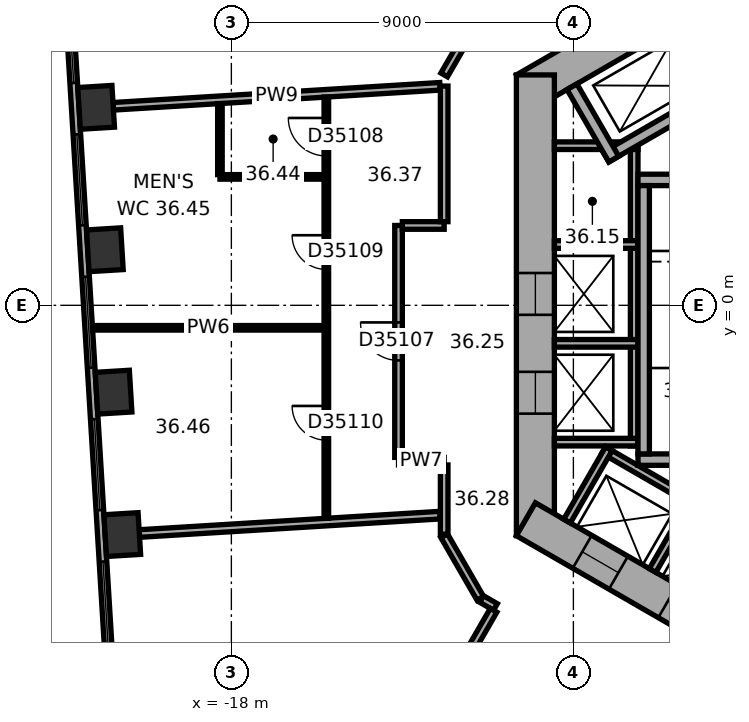
"""IFC4 building model, lengths in metres.
Left out: names, types, materials, properties, quantities, classifications, styles, units other than length and angle.
Written with IfcOpenShell. Run it as: python <this file> out.ifc"""

import sys

from ifc_helpers import new_model, si_unit, direction, frame, frame_2d, origin, origin_2d, place, context, subcontext, project, spatial, rectangle, extrude, element, fill, save


model = new_model("IFC4")
c1 = context("Model", 3, precision=1e-05, world=origin(), true_north=direction((0.0, 1.0)))
c2 = subcontext(c1, "Body", "Model", "MODEL_VIEW")
j1 = project(units=[si_unit("LENGTHUNIT", "METRE"), si_unit("PLANEANGLEUNIT", "RADIAN")], contexts=[c1])
p1 = place(None, origin())
s1 = spatial("IfcSite", under=j1, at=p1, CompositionType="ELEMENT")
p2 = place(p1, origin())
s2 = spatial("IfcBuilding", under=s1, at=p2, CompositionType="ELEMENT")
p3 = place(p2, frame((0.0, 0.0, 150.3)))
s3 = spatial("IfcBuildingStorey", under=s2, at=p3, CompositionType="ELEMENT", Elevation=150.3)
for number, where, z_axis, x_axis in (
    (1, (-21.558, 5.209, 0.0), (0.0, 0.0, 1.0), (0.061, -0.998, 0.0)),
    (2, (-21.329, 1.462, 0.0), (0.0, 0.0, 1.0), (0.061, -0.998, 0.0)),
    (3, (-21.1, -2.285, 0.0), (0.0, 0.0, 1.0), (0.061, -0.998, 0.0)),
    (4, (-20.871, -6.032, 0.0), (0.0, 0.0, 1.0), (0.061, -0.998, 0.0)),
):
    element("IfcColumn", number, at=place(p3, frame(where, z_axis=z_axis, x_axis=x_axis)), inside=s3, PredefinedType="COLUMN", context=c2, shape_type="SweptSolid", body=[
        extrude(rectangle(XDim=1.1, YDim=0.9, at=origin_2d()), origin(), (0.0, 0.0, 1.0), 3.7),
    ])
p4 = place(p3, frame((0.25, 11.691, 0.0), z_axis=(0.0, 0.0, 1.0), x_axis=(-0.866022616891, -0.50000482701, 0.0)))
e5 = element("IfcWall", 5, at=p4, inside=s3, PredefinedType="SHEAR", context=c2, shape_type="SweptSolid", body=[
    extrude(rectangle(XDim=12.125, YDim=1.0, at=frame_2d((6.062, 0.0))), origin(), (0.0, 0.0, 1.0), 3.7),
])
p5 = place(p4, frame((6.262, 0.0, 0.0)))
e6 = element("IfcOpeningElement", 6, at=p5, cuts=e5, PredefinedType="OPENING", context=c2, shape_type="SweptSolid", body=[
    extrude(rectangle(XDim=1.5, YDim=2.1, at=frame_2d((0.75, 1.05))), frame((0.0, 0.51, 0.0), z_axis=(0.0, -1.0, 0.0), x_axis=(1.0, 0.0, 0.0)), (0.0, 0.0, 1.0), 1.02),
])
p6 = place(p4, frame((1.812, 0.0, 0.0)))
e7 = element("IfcOpeningElement", 7, at=p6, cuts=e5, PredefinedType="OPENING", context=c2, shape_type="SweptSolid", body=[
    extrude(rectangle(XDim=0.9, YDim=2.1, at=frame_2d((0.45, 1.05))), frame((0.0, 0.51, 0.0), z_axis=(0.0, -1.0, 0.0), x_axis=(1.0, 0.0, 0.0)), (0.0, 0.0, 1.0), 1.02),
])
p7 = place(p4, frame((4.412, 0.0, 0.0)))
e8 = element("IfcOpeningElement", 8, at=p7, cuts=e5, PredefinedType="OPENING", context=c2, shape_type="SweptSolid", body=[
    extrude(rectangle(XDim=0.9, YDim=2.1, at=frame_2d((0.45, 1.05))), frame((0.0, 0.51, 0.0), z_axis=(0.0, -1.0, 0.0), x_axis=(1.0, 0.0, 0.0)), (0.0, 0.0, 1.0), 1.02),
])
p8 = place(p3, frame((-10.0, 6.062, 0.0), z_axis=(0.0, 0.0, 1.0), x_axis=(0.0, -1.0, 0.0)))
e9 = element("IfcWall", 9, at=p8, inside=s3, PredefinedType="SHEAR", context=c2, shape_type="SweptSolid", body=[
    extrude(rectangle(XDim=12.125, YDim=1.0, at=frame_2d((6.062, 0.0))), origin(), (0.0, 0.0, 1.0), 3.7),
])
p9 = place(p8, frame((5.212, 0.0, 0.0)))
e10 = element("IfcOpeningElement", 10, at=p9, cuts=e9, PredefinedType="OPENING", context=c2, shape_type="SweptSolid", body=[
    extrude(rectangle(XDim=1.1, YDim=2.1, at=frame_2d((0.55, 1.05))), frame((0.0, 0.51, 0.0), z_axis=(0.0, -1.0, 0.0), x_axis=(1.0, 0.0, 0.0)), (0.0, 0.0, 1.0), 1.02),
])
p10 = place(p8, frame((7.812, 0.0, 0.0)))
e11 = element("IfcOpeningElement", 11, at=p10, cuts=e9, PredefinedType="OPENING", context=c2, shape_type="SweptSolid", body=[
    extrude(rectangle(XDim=1.1, YDim=2.1, at=frame_2d((0.55, 1.05))), frame((0.0, 0.51, 0.0), z_axis=(0.0, -1.0, 0.0), x_axis=(1.0, 0.0, 0.0)), (0.0, 0.0, 1.0), 1.02),
])
p11 = place(p3, frame((-10.25, -5.629, 0.0), z_axis=(0.0, 0.0, 1.0), x_axis=(0.866022616891, -0.50000482701, 0.0)))
e12 = element("IfcWall", 12, at=p11, inside=s3, PredefinedType="SHEAR", context=c2, shape_type="SweptSolid", body=[
    extrude(rectangle(XDim=12.125, YDim=1.0, at=frame_2d((6.062, 0.0))), origin(), (0.0, 0.0, 1.0), 3.7),
])
p12 = place(p11, frame((6.262, 0.0, 0.0)))
e13 = element("IfcOpeningElement", 13, at=p12, cuts=e12, PredefinedType="OPENING", context=c2, shape_type="SweptSolid", body=[
    extrude(rectangle(XDim=1.5, YDim=2.1, at=frame_2d((0.75, 1.05))), frame((0.0, 0.51, 0.0), z_axis=(0.0, -1.0, 0.0), x_axis=(1.0, 0.0, 0.0)), (0.0, 0.0, 1.0), 1.02),
])
p13 = place(p11, frame((1.712, 0.0, 0.0)))
e14 = element("IfcOpeningElement", 14, at=p13, cuts=e12, PredefinedType="OPENING", context=c2, shape_type="SweptSolid", body=[
    extrude(rectangle(XDim=1.1, YDim=2.1, at=frame_2d((0.55, 1.05))), frame((0.0, 0.51, 0.0), z_axis=(0.0, -1.0, 0.0), x_axis=(1.0, 0.0, 0.0)), (0.0, 0.0, 1.0), 1.02),
])
p14 = place(p11, frame((4.312, 0.0, 0.0)))
e15 = element("IfcOpeningElement", 15, at=p14, cuts=e12, PredefinedType="OPENING", context=c2, shape_type="SweptSolid", body=[
    extrude(rectangle(XDim=1.1, YDim=2.1, at=frame_2d((0.55, 1.05))), frame((0.0, 0.51, 0.0), z_axis=(0.0, -1.0, 0.0), x_axis=(1.0, 0.0, 0.0)), (0.0, 0.0, 1.0), 1.02),
])
p15 = place(p3, frame((-22.375, 9.557, 0.0), z_axis=(0.0, 0.0, 1.0), x_axis=(0.061036015339, -0.998135564356, 0.0)))
e16 = element("IfcWall", 16, at=p15, inside=s3, PredefinedType="STANDARD", context=c2, shape_type="SweptSolid", body=[
    extrude(rectangle(XDim=20.044, YDim=0.2, at=frame_2d((10.022, 0.0))), origin(), (0.0, 0.0, 1.0), 3.7),
])
p16 = place(p15, frame((1.313, 0.0, 0.9)))
e17 = element("IfcOpeningElement", 17, at=p16, cuts=e16, PredefinedType="OPENING", context=c2, shape_type="SweptSolid", body=[
    extrude(rectangle(XDim=2.4, YDim=2.0, at=frame_2d((1.2, 1.0))), frame((0.0, 0.11, 0.0), z_axis=(0.0, -1.0, 0.0), x_axis=(1.0, 0.0, 0.0)), (0.0, 0.0, 1.0), 0.22),
])
p17 = place(p15, frame((5.067, 0.0, 0.9)))
e18 = element("IfcOpeningElement", 18, at=p17, cuts=e16, PredefinedType="OPENING", context=c2, shape_type="SweptSolid", body=[
    extrude(rectangle(XDim=2.4, YDim=2.0, at=frame_2d((1.2, 1.0))), frame((0.0, 0.11, 0.0), z_axis=(0.0, -1.0, 0.0), x_axis=(1.0, 0.0, 0.0)), (0.0, 0.0, 1.0), 0.22),
])
p18 = place(p15, frame((8.821, 0.0, 0.9)))
e19 = element("IfcOpeningElement", 19, at=p18, cuts=e16, PredefinedType="OPENING", context=c2, shape_type="SweptSolid", body=[
    extrude(rectangle(XDim=2.4, YDim=2.0, at=frame_2d((1.2, 1.0))), frame((0.0, 0.11, 0.0), z_axis=(0.0, -1.0, 0.0), x_axis=(1.0, 0.0, 0.0)), (0.0, 0.0, 1.0), 0.22),
])
p19 = place(p15, frame((12.575, 0.0, 0.9)))
e20 = element("IfcOpeningElement", 20, at=p19, cuts=e16, PredefinedType="OPENING", context=c2, shape_type="SweptSolid", body=[
    extrude(rectangle(XDim=2.4, YDim=2.0, at=frame_2d((1.2, 1.0))), frame((0.0, 0.11, 0.0), z_axis=(0.0, -1.0, 0.0), x_axis=(1.0, 0.0, 0.0)), (0.0, 0.0, 1.0), 0.22),
])
p20 = place(p15, frame((16.329, 0.0, 0.9)))
e21 = element("IfcOpeningElement", 21, at=p20, cuts=e16, PredefinedType="OPENING", context=c2, shape_type="SweptSolid", body=[
    extrude(rectangle(XDim=2.4, YDim=2.0, at=frame_2d((1.2, 1.0))), frame((0.0, 0.11, 0.0), z_axis=(0.0, -1.0, 0.0), x_axis=(1.0, 0.0, 0.0)), (0.0, 0.0, 1.0), 0.22),
])
p21 = place(p3, frame((-7.4, 4.3, 0.0), z_axis=(0.0, 0.0, 1.0), x_axis=(0.0, -1.0, 0.0)))
e22 = element("IfcWall", 22, at=p21, inside=s3, PredefinedType="PARTITIONING", context=c2, shape_type="SweptSolid", body=[
    extrude(rectangle(XDim=8.0, YDim=0.2, at=frame_2d((4.0, 0.0))), origin(), (0.0, 0.0, 1.0), 3.42),
])
for number, where, z_axis, x_axis in (
    (23, (-7.3, 4.2, 0.0), (0.0, 0.0, 1.0), (-1.0, 0.0, 0.0)),
    (24, (-7.3, 1.6, 0.0), (0.0, 0.0, 1.0), (-1.0, 0.0, 0.0)),
    (25, (-7.3, -1.0, 0.0), (0.0, 0.0, 1.0), (-1.0, 0.0, 0.0)),
    (26, (-7.3, -3.6, 0.0), (0.0, 0.0, 1.0), (-1.0, 0.0, 0.0)),
):
    element("IfcWall", number, at=place(p3, frame(where, z_axis=z_axis, x_axis=x_axis)), inside=s3, PredefinedType="PARTITIONING", context=c2, shape_type="SweptSolid", body=[
        extrude(rectangle(XDim=2.2, YDim=0.2, at=frame_2d((1.1, 0.0))), origin(), (0.0, 0.0, 1.0), 3.42),
    ])
p22 = place(p3, frame((-8.203, -3.809, 0.0), z_axis=(0.0, 0.0, 1.0), x_axis=(0.866028230842, -0.499995103361, 0.0)))
e27 = element("IfcWall", 27, at=p22, inside=s3, PredefinedType="PARTITIONING", context=c2, shape_type="SweptSolid", body=[
    extrude(rectangle(XDim=5.4, YDim=0.2, at=frame_2d((2.7, 0.0))), origin(), (0.0, 0.0, 1.0), 3.42),
])
for number, where, z_axis, x_axis in (
    (28, (-8.067, -3.772, 0.0), (0.0, 0.0, 1.0), (-0.5, -0.866, 0.0)),
    (29, (-5.815, -5.072, 0.0), (0.0, 0.0, 1.0), (-0.5, -0.866, 0.0)),
):
    element("IfcWall", number, at=place(p3, frame(where, z_axis=z_axis, x_axis=x_axis)), inside=s3, PredefinedType="PARTITIONING", context=c2, shape_type="SweptSolid", body=[
        extrude(rectangle(XDim=2.2, YDim=0.2, at=frame_2d((1.1, 0.0))), origin(), (0.0, 0.0, 1.0), 3.42),
    ])
p23 = place(p3, frame((-2.6, 3.3, 0.0), z_axis=(0.0, 0.0, 1.0), x_axis=(-1.0, 0.0, 0.0)))
e30 = element("IfcWall", 30, at=p23, inside=s3, PredefinedType="SHEAR", context=c2, shape_type="SweptSolid", body=[
    extrude(rectangle(XDim=4.7, YDim=0.3, at=frame_2d((2.35, 0.0))), origin(), (0.0, 0.0, 1.0), 3.42),
])
p24 = place(p23, frame((0.8, 0.0, 0.0)))
e31 = element("IfcOpeningElement", 31, at=p24, cuts=e30, PredefinedType="OPENING", context=c2, shape_type="SweptSolid", body=[
    extrude(rectangle(XDim=1.2, YDim=2.1, at=frame_2d((0.6, 1.05))), frame((0.0, 0.16, 0.0), z_axis=(0.0, -1.0, 0.0), x_axis=(1.0, 0.0, 0.0)), (0.0, 0.0, 1.0), 0.32),
])
p25 = place(p3, frame((-2.6, -4.06, 0.0), z_axis=(0.0, 0.0, 1.0), x_axis=(-1.0, 0.0, 0.0)))
e32 = element("IfcWall", 32, at=p25, inside=s3, PredefinedType="SHEAR", context=c2, shape_type="SweptSolid", body=[
    extrude(rectangle(XDim=4.7, YDim=0.3, at=frame_2d((2.35, 0.0))), origin(), (0.0, 0.0, 1.0), 3.42),
])
p26 = place(p3, frame((-7.15, 3.15, 0.0), z_axis=(0.0, 0.0, 1.0), x_axis=(0.0, -1.0, 0.0)))
e33 = element("IfcWall", 33, at=p26, inside=s3, PredefinedType="SHEAR", context=c2, shape_type="SweptSolid", body=[
    extrude(rectangle(XDim=7.06, YDim=0.3, at=frame_2d((3.53, 0.0))), origin(), (0.0, 0.0, 1.0), 3.42),
])
p27 = place(p3, frame((-5.295, 5.372, 0.0), z_axis=(0.0, 0.0, 1.0), x_axis=(-0.500077893725, 0.86598042715, 0.0)))
e34 = element("IfcWall", 34, at=p27, inside=s3, PredefinedType="SHEAR", context=c2, shape_type="SweptSolid", body=[
    extrude(rectangle(XDim=2.2, YDim=0.3, at=frame_2d((1.1, 0.0))), origin(), (0.0, 0.0, 1.0), 3.42),
])
p28 = place(p27, frame((0.7, 0.0, 0.0)))
e35 = element("IfcOpeningElement", 35, at=p28, cuts=e34, PredefinedType="OPENING", context=c2, shape_type="SweptSolid", body=[
    extrude(rectangle(XDim=1.1, YDim=2.1, at=frame_2d((0.55, 1.05))), frame((0.0, 0.16, 0.0), z_axis=(0.0, -1.0, 0.0), x_axis=(1.0, 0.0, 0.0)), (0.0, 0.0, 1.0), 0.32),
])
p29 = place(p3, frame((-5.24, 5.577, 0.0), z_axis=(0.0, 0.0, 1.0), x_axis=(-0.866014461049, -0.500018952895, 0.0)))
e36 = element("IfcWall", 36, at=p29, inside=s3, PredefinedType="SHEAR", context=c2, shape_type="SweptSolid", body=[
    extrude(rectangle(XDim=3.35, YDim=0.3, at=frame_2d((1.675, 0.0))), origin(), (0.0, 0.0, 1.0), 3.42),
])
p30 = place(p3, frame((-7.937, 3.847, 0.0), z_axis=(0.0, 0.0, 1.0), x_axis=(-0.50002983664, 0.866008176907, 0.0)))
e37 = element("IfcWall", 37, at=p30, inside=s3, PredefinedType="SHEAR", context=c2, shape_type="SweptSolid", body=[
    extrude(rectangle(XDim=2.2, YDim=0.3, at=frame_2d((1.1, 0.0))), origin(), (0.0, 0.0, 1.0), 3.42),
])
p31 = place(p3, frame((-21.654, -0.592, 0.0), z_axis=(0.0, 0.0, 1.0), x_axis=(1.0, 0.0, 0.0)))
e38 = element("IfcWall", 38, at=p31, inside=s3, PredefinedType="PARTITIONING", context=c2, shape_type="SweptSolid", body=[
    extrude(rectangle(XDim=6.093, YDim=0.12, at=frame_2d((3.046, 0.0))), origin(), (0.0, 0.0, 1.0), 3.42),
])
p32 = place(p3, frame((-21.109, 5.237, 0.0), z_axis=(0.0, 0.0, 1.0), x_axis=(0.998135264293, 0.061040922131, 0.0)))
e39 = element("IfcWall", 39, at=p32, inside=s3, PredefinedType="PARTITIONING", context=c2, shape_type="SweptSolid", body=[
    extrude(rectangle(XDim=8.615, YDim=0.2, at=frame_2d((4.308, 0.0))), origin(), (0.0, 0.0, 1.0), 3.42),
])
p33 = place(p3, frame((-20.421, -6.005, 0.0), z_axis=(0.0, 0.0, 1.0), x_axis=(0.998134865741, 0.061047438866, 0.0)))
e40 = element("IfcWall", 40, at=p33, inside=s3, PredefinedType="PARTITIONING", context=c2, shape_type="SweptSolid", body=[
    extrude(rectangle(XDim=7.927, YDim=0.2, at=frame_2d((3.963, 0.0))), origin(), (0.0, 0.0, 1.0), 2.87),
])
p34 = place(p3, frame((-18.301, 3.38, 0.0), z_axis=(0.0, 0.0, 1.0), x_axis=(1.0, 0.0, 0.0)))
e41 = element("IfcWall", 41, at=p34, inside=s3, PredefinedType="PARTITIONING", context=c2, shape_type="SweptSolid", body=[
    extrude(rectangle(XDim=2.74, YDim=0.12, at=frame_2d((1.37, 0.0))), origin(), (0.0, 0.0, 1.0), 3.42),
])
p35 = place(p3, frame((-18.301, 5.308, 0.0), z_axis=(0.0, 0.0, 1.0), x_axis=(0.0, -1.0, 0.0)))
e42 = element("IfcWall", 42, at=p35, inside=s3, PredefinedType="PARTITIONING", context=c2, shape_type="SweptSolid", body=[
    extrude(rectangle(XDim=1.869, YDim=0.12, at=frame_2d((0.934, 0.0))), origin(), (0.0, 0.0, 1.0), 3.42),
])
p36 = place(p3, frame((-15.501, 5.479, 0.0), z_axis=(0.0, 0.0, 1.0), x_axis=(0.0, -1.0, 0.0)))
e43 = element("IfcWall", 43, at=p36, inside=s3, PredefinedType="PARTITIONING", context=c2, shape_type="SweptSolid", body=[
    extrude(rectangle(XDim=11.083, YDim=0.12, at=frame_2d((5.542, 0.0))), origin(), (0.0, 0.0, 1.0), 3.42),
])
p37 = place(p36, frame((0.55, 0.0, 0.0)))
e44 = element("IfcOpeningElement", 44, at=p37, cuts=e43, PredefinedType="OPENING", context=c2, shape_type="SweptSolid", body=[
    extrude(rectangle(XDim=1.0, YDim=2.1, at=frame_2d((0.5, 1.05))), frame((0.0, 0.07, 0.0), z_axis=(0.0, -1.0, 0.0), x_axis=(1.0, 0.0, 0.0)), (0.0, 0.0, 1.0), 0.14),
])
p38 = place(p36, frame((3.636, 0.0, 0.0)))
e45 = element("IfcOpeningElement", 45, at=p38, cuts=e43, PredefinedType="OPENING", context=c2, shape_type="SweptSolid", body=[
    extrude(rectangle(XDim=0.9, YDim=2.1, at=frame_2d((0.45, 1.05))), frame((0.0, 0.07, 0.0), z_axis=(0.0, -1.0, 0.0), x_axis=(1.0, 0.0, 0.0)), (0.0, 0.0, 1.0), 0.14),
])
p39 = place(p36, frame((8.127, 0.0, 0.0)))
e46 = element("IfcOpeningElement", 46, at=p39, cuts=e43, PredefinedType="OPENING", context=c2, shape_type="SweptSolid", body=[
    extrude(rectangle(XDim=0.9, YDim=2.1, at=frame_2d((0.45, 1.05))), frame((0.0, 0.07, 0.0), z_axis=(0.0, -1.0, 0.0), x_axis=(1.0, 0.0, 0.0)), (0.0, 0.0, 1.0), 0.14),
])
p40 = place(p3, frame((-13.601, -4.101, 0.0), z_axis=(0.0, 0.0, 1.0), x_axis=(1.0, 0.0, 0.0)))
e47 = element("IfcWall", 47, at=p40, inside=s3, PredefinedType="PARTITIONING", context=c2, shape_type="SweptSolid", body=[
    extrude(rectangle(XDim=1.201, YDim=0.2, at=frame_2d((0.601, 0.0))), origin(), (0.0, 0.0, 1.0), 3.42),
])
p41 = place(p3, frame((-13.601, 2.101, 0.0), z_axis=(0.0, 0.0, 1.0), x_axis=(0.0, -1.0, 0.0)))
e48 = element("IfcWall", 48, at=p41, inside=s3, PredefinedType="PARTITIONING", context=c2, shape_type="SweptSolid", body=[
    extrude(rectangle(XDim=6.102, YDim=0.2, at=frame_2d((3.051, 0.0))), origin(), (0.0, 0.0, 1.0), 3.42),
])
p42 = place(p41, frame((2.551, 0.0, 0.0)))
e49 = element("IfcOpeningElement", 49, at=p42, cuts=e48, PredefinedType="OPENING", context=c2, shape_type="SweptSolid", body=[
    extrude(rectangle(XDim=1.0, YDim=2.1, at=frame_2d((0.5, 1.05))), frame((0.0, 0.11, 0.0), z_axis=(0.0, -1.0, 0.0), x_axis=(1.0, 0.0, 0.0)), (0.0, 0.0, 1.0), 0.22),
])
p43 = place(p3, frame((-12.4, -6.062, 0.0), z_axis=(0.0, 0.0, 1.0), x_axis=(0.500022797313, -0.86601224135, 0.0)))
e50 = element("IfcWall", 50, at=p43, inside=s3, PredefinedType="PARTITIONING", context=c2, shape_type="SweptSolid", body=[
    extrude(rectangle(XDim=1.9, YDim=0.2, at=frame_2d((0.95, 0.0))), origin(), (0.0, 0.0, 1.0), 3.42),
])
p44 = place(p3, frame((-12.4, -4.201, 0.0), z_axis=(0.0, 0.0, 1.0), x_axis=(0.0, -1.0, 0.0)))
e51 = element("IfcWall", 51, at=p44, inside=s3, PredefinedType="PARTITIONING", context=c2, shape_type="SweptSolid", body=[
    extrude(rectangle(XDim=1.821, YDim=0.2, at=frame_2d((0.911, 0.0))), origin(), (0.0, 0.0, 1.0), 3.42),
])
p45 = place(p3, frame((-12.4, 2.101, 0.0), z_axis=(0.0, 0.0, 1.0), x_axis=(-1.0, 0.0, 0.0)))
e52 = element("IfcWall", 52, at=p45, inside=s3, PredefinedType="PARTITIONING", context=c2, shape_type="SweptSolid", body=[
    extrude(rectangle(XDim=1.101, YDim=0.2, at=frame_2d((0.551, 0.0))), origin(), (0.0, 0.0, 1.0), 3.42),
])
p46 = place(p3, frame((-12.4, 5.769, 0.0), z_axis=(0.0, 0.0, 1.0), x_axis=(0.0, -1.0, 0.0)))
e53 = element("IfcWall", 53, at=p46, inside=s3, PredefinedType="PARTITIONING", context=c2, shape_type="SweptSolid", body=[
    extrude(rectangle(XDim=3.568, YDim=0.2, at=frame_2d((1.784, 0.0))), origin(), (0.0, 0.0, 1.0), 3.42),
])
p47 = place(p3, frame((-11.45, 7.708, 0.0), z_axis=(0.0, 0.0, 1.0), x_axis=(-0.500022797313, -0.86601224135, 0.0)))
e54 = element("IfcWall", 54, at=p47, inside=s3, PredefinedType="PARTITIONING", context=c2, shape_type="SweptSolid", body=[
    extrude(rectangle(XDim=1.9, YDim=0.2, at=frame_2d((0.95, 0.0))), origin(), (0.0, 0.0, 1.0), 3.42),
])
p48 = place(p3, frame((-11.415, -7.728, 0.0), z_axis=(0.0, 0.0, 1.0), x_axis=(0.865915281873, -0.500190688257, 0.0)))
e55 = element("IfcWall", 55, at=p48, inside=s3, PredefinedType="PARTITIONING", context=c2, shape_type="SweptSolid", body=[
    extrude(rectangle(XDim=0.421, YDim=0.2, at=frame_2d((0.21, 0.0))), origin(), (0.0, 0.0, 1.0), 3.42),
])
p49 = place(p3, frame((-11.101, -8.025, 0.0), z_axis=(0.0, 0.0, 1.0), x_axis=(-0.500074377092, -0.865982457891, 0.0)))
e56 = element("IfcWall", 56, at=p49, inside=s3, PredefinedType="PARTITIONING", context=c2, shape_type="SweptSolid", body=[
    extrude(rectangle(XDim=1.101, YDim=0.2, at=frame_2d((0.55, 0.0))), origin(), (0.0, 0.0, 1.0), 3.42),
])
p50 = place(p16, origin())
e57 = element("IfcWindow", 57, at=p50, inside=s3, PartitioningType="SINGLE_PANEL", PredefinedType="WINDOW", context=c2, shape_type="SweptSolid", body=[
    extrude(rectangle(XDim=2.4, YDim=2.0, at=frame_2d((1.2, 1.0))), frame((0.0, 0.03, 0.0), z_axis=(0.0, -1.0, 0.0), x_axis=(1.0, 0.0, 0.0)), (0.0, 0.0, 1.0), 0.06),
])
fill(e17, e57)
p51 = place(p17, origin())
e58 = element("IfcWindow", 58, at=p51, inside=s3, PartitioningType="SINGLE_PANEL", PredefinedType="WINDOW", context=c2, shape_type="SweptSolid", body=[
    extrude(rectangle(XDim=2.4, YDim=2.0, at=frame_2d((1.2, 1.0))), frame((0.0, 0.03, 0.0), z_axis=(0.0, -1.0, 0.0), x_axis=(1.0, 0.0, 0.0)), (0.0, 0.0, 1.0), 0.06),
])
fill(e18, e58)
p52 = place(p18, origin())
e59 = element("IfcWindow", 59, at=p52, inside=s3, PartitioningType="SINGLE_PANEL", PredefinedType="WINDOW", context=c2, shape_type="SweptSolid", body=[
    extrude(rectangle(XDim=2.4, YDim=2.0, at=frame_2d((1.2, 1.0))), frame((0.0, 0.03, 0.0), z_axis=(0.0, -1.0, 0.0), x_axis=(1.0, 0.0, 0.0)), (0.0, 0.0, 1.0), 0.06),
])
fill(e19, e59)
p53 = place(p19, origin())
e60 = element("IfcWindow", 60, at=p53, inside=s3, PartitioningType="SINGLE_PANEL", PredefinedType="WINDOW", context=c2, shape_type="SweptSolid", body=[
    extrude(rectangle(XDim=2.4, YDim=2.0, at=frame_2d((1.2, 1.0))), frame((0.0, 0.03, 0.0), z_axis=(0.0, -1.0, 0.0), x_axis=(1.0, 0.0, 0.0)), (0.0, 0.0, 1.0), 0.06),
])
fill(e20, e60)
p54 = place(p20, origin())
e61 = element("IfcWindow", 61, at=p54, inside=s3, PartitioningType="SINGLE_PANEL", PredefinedType="WINDOW", context=c2, shape_type="SweptSolid", body=[
    extrude(rectangle(XDim=2.4, YDim=2.0, at=frame_2d((1.2, 1.0))), frame((0.0, 0.03, 0.0), z_axis=(0.0, -1.0, 0.0), x_axis=(1.0, 0.0, 0.0)), (0.0, 0.0, 1.0), 0.06),
])
fill(e21, e61)
p55 = place(p9, origin())
e62 = element("IfcDoor", 62, at=p55, inside=s3, OperationType="DOUBLE_DOOR_SLIDING", PredefinedType="DOOR", context=c2, shape_type="SweptSolid", body=[
    extrude(rectangle(XDim=1.1, YDim=2.1, at=frame_2d((0.55, 1.05))), frame((0.0, 0.025, 0.0), z_axis=(0.0, -1.0, 0.0), x_axis=(1.0, 0.0, 0.0)), (0.0, 0.0, 1.0), 0.05),
])
fill(e10, e62)
p56 = place(p10, origin())
e63 = element("IfcDoor", 63, at=p56, inside=s3, OperationType="DOUBLE_DOOR_SLIDING", PredefinedType="DOOR", context=c2, shape_type="SweptSolid", body=[
    extrude(rectangle(XDim=1.1, YDim=2.1, at=frame_2d((0.55, 1.05))), frame((0.0, 0.025, 0.0), z_axis=(0.0, -1.0, 0.0), x_axis=(1.0, 0.0, 0.0)), (0.0, 0.0, 1.0), 0.05),
])
fill(e11, e63)
p57 = place(p13, origin())
e64 = element("IfcDoor", 64, at=p57, inside=s3, OperationType="DOUBLE_DOOR_SLIDING", PredefinedType="DOOR", context=c2, shape_type="SweptSolid", body=[
    extrude(rectangle(XDim=1.1, YDim=2.1, at=frame_2d((0.55, 1.05))), frame((0.0, 0.025, 0.0), z_axis=(0.0, -1.0, 0.0), x_axis=(1.0, 0.0, 0.0)), (0.0, 0.0, 1.0), 0.05),
])
fill(e14, e64)
p58 = place(p14, origin())
e65 = element("IfcDoor", 65, at=p58, inside=s3, OperationType="DOUBLE_DOOR_SLIDING", PredefinedType="DOOR", context=c2, shape_type="SweptSolid", body=[
    extrude(rectangle(XDim=1.1, YDim=2.1, at=frame_2d((0.55, 1.05))), frame((0.0, 0.025, 0.0), z_axis=(0.0, -1.0, 0.0), x_axis=(1.0, 0.0, 0.0)), (0.0, 0.0, 1.0), 0.05),
])
fill(e15, e65)
p59 = place(p42, origin())
e66 = element("IfcDoor", 66, at=p59, inside=s3, OperationType="SINGLE_SWING_LEFT", PredefinedType="DOOR", context=c2, shape_type="SweptSolid", body=[
    extrude(rectangle(XDim=1.0, YDim=2.1, at=frame_2d((0.5, 1.05))), frame((0.0, 0.025, 0.0), z_axis=(0.0, -1.0, 0.0), x_axis=(1.0, 0.0, 0.0)), (0.0, 0.0, 1.0), 0.05),
])
fill(e49, e66)
p60 = place(p37, origin())
e67 = element("IfcDoor", 67, at=p60, inside=s3, OperationType="SINGLE_SWING_LEFT", PredefinedType="DOOR", context=c2, shape_type="SweptSolid", body=[
    extrude(rectangle(XDim=1.0, YDim=2.1, at=frame_2d((0.5, 1.05))), frame((0.0, 0.025, 0.0), z_axis=(0.0, -1.0, 0.0), x_axis=(1.0, 0.0, 0.0)), (0.0, 0.0, 1.0), 0.05),
])
fill(e44, e67)
p61 = place(p38, origin())
e68 = element("IfcDoor", 68, at=p61, inside=s3, OperationType="SINGLE_SWING_LEFT", PredefinedType="DOOR", context=c2, shape_type="SweptSolid", body=[
    extrude(rectangle(XDim=0.9, YDim=2.1, at=frame_2d((0.45, 1.05))), frame((0.0, 0.025, 0.0), z_axis=(0.0, -1.0, 0.0), x_axis=(1.0, 0.0, 0.0)), (0.0, 0.0, 1.0), 0.05),
])
fill(e45, e68)
p62 = place(p39, origin())
e69 = element("IfcDoor", 69, at=p62, inside=s3, OperationType="SINGLE_SWING_LEFT", PredefinedType="DOOR", context=c2, shape_type="SweptSolid", body=[
    extrude(rectangle(XDim=0.9, YDim=2.1, at=frame_2d((0.45, 1.05))), frame((0.0, 0.025, 0.0), z_axis=(0.0, -1.0, 0.0), x_axis=(1.0, 0.0, 0.0)), (0.0, 0.0, 1.0), 0.05),
])
fill(e46, e69)
save(model, sys.argv[1])
